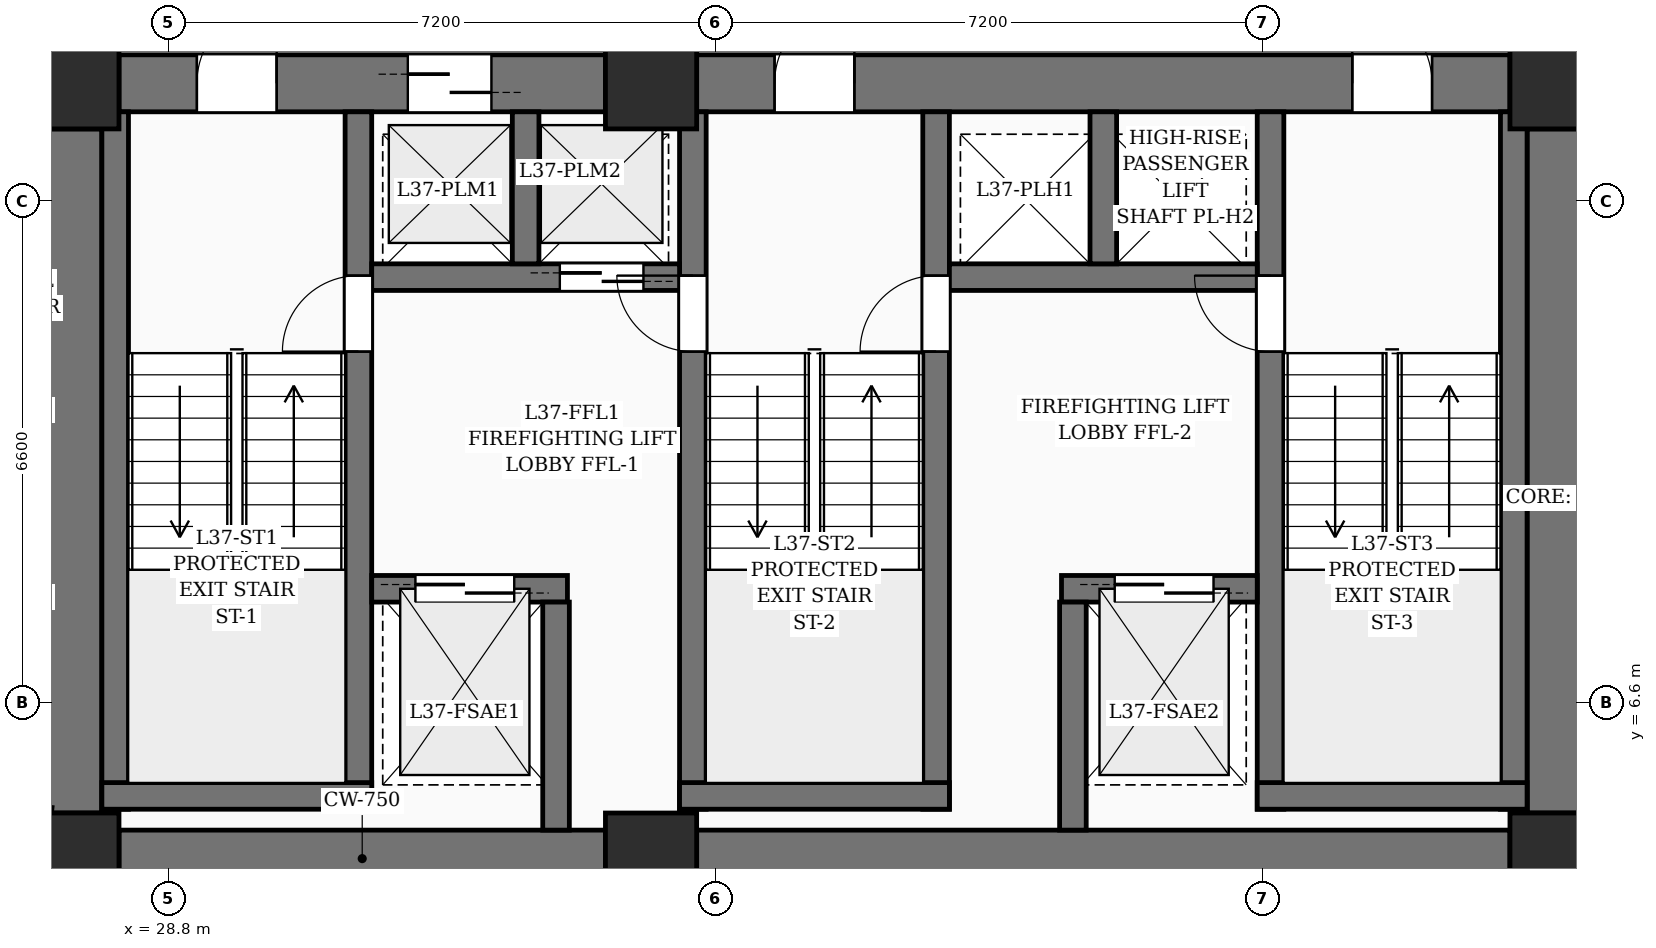
"""IFC4 building model, lengths in metres.
Left out: names, types, materials, properties, quantities, classifications, styles, units other than length and angle.
Written with IfcOpenShell. Run it as: python <this file> out.ifc"""

import sys

from ifc_helpers import new_model, si_unit, direction, frame, frame_2d, origin, origin_2d, place, context, subcontext, project, spatial, rectangle, extrude, element, fill, save


model = new_model("IFC4")
c1 = context("Model", 3, precision=1e-05, world=origin(), true_north=direction((0.0, 1.0)))
c2 = subcontext(c1, "Body", "Model", "MODEL_VIEW")
j1 = project(units=[si_unit("LENGTHUNIT", "METRE"), si_unit("PLANEANGLEUNIT", "RADIAN")], contexts=[c1])
p1 = place(None, origin())
s1 = spatial("IfcSite", under=j1, at=p1, CompositionType="ELEMENT")
p2 = place(p1, origin())
s2 = spatial("IfcBuilding", under=s1, at=p2, CompositionType="ELEMENT")
p3 = place(p2, frame((0.0, 0.0, 146.4)))
s3 = spatial("IfcBuildingStorey", under=s2, at=p3, CompositionType="ELEMENT", Elevation=146.4)
for number, where, z_axis, x_axis in (
    (1, (27.55, 4.55, 0.0), (0.0, 0.0, 1.0), (1.0, 0.0, 0.0)),
    (2, (35.15, 4.55, 0.0), (0.0, 0.0, 1.0), (1.0, 0.0, 0.0)),
    (3, (47.05, 4.55, 0.0), (0.0, 0.0, 1.0), (1.0, 0.0, 0.0)),
    (4, (27.55, 14.75, 0.0), (0.0, 0.0, 1.0), (1.0, 0.0, 0.0)),
    (5, (35.15, 14.75, 0.0), (0.0, 0.0, 1.0), (1.0, 0.0, 0.0)),
    (6, (47.05, 14.75, 0.0), (0.0, 0.0, 1.0), (1.0, 0.0, 0.0)),
):
    element("IfcColumn", number, at=place(p3, frame(where, z_axis=z_axis, x_axis=x_axis)), inside=s3, PredefinedType="COLUMN", context=c2, shape_type="SweptSolid", body=[
        extrude(rectangle(XDim=1.2, YDim=1.2, at=origin_2d()), origin(), (0.0, 0.0, 1.0), 3.6),
    ])
p4 = place(p3, frame((28.15, 4.55, 0.0), z_axis=(0.0, 0.0, 1.0), x_axis=(1.0, 0.0, 0.0)))
e7 = element("IfcWall", 7, at=p4, inside=s3, PredefinedType="SHEAR", context=c2, shape_type="SweptSolid", body=[
    extrude(rectangle(XDim=6.4, YDim=0.75, at=frame_2d((3.2, 0.0))), origin(), (0.0, 0.0, 1.0), 3.6),
])
p5 = place(p3, frame((35.75, 4.55, 0.0), z_axis=(0.0, 0.0, 1.0), x_axis=(1.0, 0.0, 0.0)))
e8 = element("IfcWall", 8, at=p5, inside=s3, PredefinedType="SHEAR", context=c2, shape_type="SweptSolid", body=[
    extrude(rectangle(XDim=10.7, YDim=0.75, at=frame_2d((5.35, 0.0))), origin(), (0.0, 0.0, 1.0), 3.6),
])
p6 = place(p3, frame((28.15, 14.75, 0.0), z_axis=(0.0, 0.0, 1.0), x_axis=(1.0, 0.0, 0.0)))
e9 = element("IfcWall", 9, at=p6, inside=s3, PredefinedType="SHEAR", context=c2, shape_type="SweptSolid", body=[
    extrude(rectangle(XDim=6.4, YDim=0.75, at=frame_2d((3.2, 0.0))), origin(), (0.0, 0.0, 1.0), 3.6),
])
p7 = place(p6, frame((1.025, 0.0, 0.0)))
e10 = element("IfcOpeningElement", 10, at=p7, cuts=e9, PredefinedType="OPENING", context=c2, shape_type="SweptSolid", body=[
    extrude(rectangle(XDim=1.05, YDim=2.15, at=frame_2d((0.525, 1.075))), frame((0.0, 0.385, 0.0), z_axis=(0.0, -1.0, 0.0), x_axis=(1.0, 0.0, 0.0)), (0.0, 0.0, 1.0), 0.77),
])
p8 = place(p6, frame((3.8, 0.0, 0.0)))
e11 = element("IfcOpeningElement", 11, at=p8, cuts=e9, PredefinedType="OPENING", context=c2, shape_type="SweptSolid", body=[
    extrude(rectangle(XDim=1.1, YDim=2.2, at=frame_2d((0.55, 1.1))), frame((0.0, 0.385, 0.0), z_axis=(0.0, -1.0, 0.0), x_axis=(1.0, 0.0, 0.0)), (0.0, 0.0, 1.0), 0.77),
])
p9 = place(p3, frame((35.75, 14.75, 0.0), z_axis=(0.0, 0.0, 1.0), x_axis=(1.0, 0.0, 0.0)))
e12 = element("IfcWall", 12, at=p9, inside=s3, PredefinedType="SHEAR", context=c2, shape_type="SweptSolid", body=[
    extrude(rectangle(XDim=10.7, YDim=0.75, at=frame_2d((5.35, 0.0))), origin(), (0.0, 0.0, 1.0), 3.6),
])
p10 = place(p9, frame((1.025, 0.0, 0.0)))
e13 = element("IfcOpeningElement", 13, at=p10, cuts=e12, PredefinedType="OPENING", context=c2, shape_type="SweptSolid", body=[
    extrude(rectangle(XDim=1.05, YDim=2.15, at=frame_2d((0.525, 1.075))), frame((0.0, 0.385, 0.0), z_axis=(0.0, -1.0, 0.0), x_axis=(1.0, 0.0, 0.0)), (0.0, 0.0, 1.0), 0.77),
])
p11 = place(p9, frame((8.625, 0.0, 0.0)))
e14 = element("IfcOpeningElement", 14, at=p11, cuts=e12, PredefinedType="OPENING", context=c2, shape_type="SweptSolid", body=[
    extrude(rectangle(XDim=1.05, YDim=2.15, at=frame_2d((0.525, 1.075))), frame((0.0, 0.385, 0.0), z_axis=(0.0, -1.0, 0.0), x_axis=(1.0, 0.0, 0.0)), (0.0, 0.0, 1.0), 0.77),
])
for number, where, z_axis, x_axis in (
    (15, (27.55, 5.15, 0.0), (0.0, 0.0, 1.0), (0.0, 1.0, 0.0)),
    (16, (47.05, 5.15, 0.0), (0.0, 0.0, 1.0), (0.0, 1.0, 0.0)),
):
    element("IfcWall", number, at=place(p3, frame(where, z_axis=z_axis, x_axis=x_axis)), inside=s3, PredefinedType="SHEAR", context=c2, shape_type="SweptSolid", body=[
        extrude(rectangle(XDim=9.0, YDim=0.75, at=frame_2d((4.5, 0.0))), origin(), (0.0, 0.0, 1.0), 3.6),
    ])
p12 = place(p3, frame((28.1, 5.2, 0.0), z_axis=(0.0, 0.0, 1.0), x_axis=(0.0, 1.0, 0.0)))
e17 = element("IfcWall", 17, at=p12, inside=s3, PredefinedType="SOLIDWALL", context=c2, shape_type="SweptSolid", body=[
    extrude(rectangle(XDim=9.175, YDim=0.35, at=frame_2d((4.587, 0.0))), origin(), (0.0, 0.0, 1.0), 3.6),
])
p13 = place(p3, frame((31.3, 5.2, 0.0), z_axis=(0.0, 0.0, 1.0), x_axis=(0.0, 1.0, 0.0)))
e18 = element("IfcWall", 18, at=p13, inside=s3, PredefinedType="SOLIDWALL", context=c2, shape_type="SweptSolid", body=[
    extrude(rectangle(XDim=9.175, YDim=0.35, at=frame_2d((4.587, 0.0))), origin(), (0.0, 0.0, 1.0), 3.6),
])
p14 = place(p13, frame((6.02, 0.0, 0.0)))
e19 = element("IfcOpeningElement", 19, at=p14, cuts=e18, PredefinedType="OPENING", context=c2, shape_type="SweptSolid", body=[
    extrude(rectangle(XDim=1.0, YDim=2.15, at=frame_2d((0.5, 1.075))), frame((0.0, 0.185, 0.0), z_axis=(0.0, -1.0, 0.0), x_axis=(1.0, 0.0, 0.0)), (0.0, 0.0, 1.0), 0.37),
])
p15 = place(p3, frame((27.925, 5.375, 0.0), z_axis=(0.0, 0.0, 1.0), x_axis=(1.0, 0.0, 0.0)))
e20 = element("IfcWall", 20, at=p15, inside=s3, PredefinedType="SOLIDWALL", context=c2, shape_type="SweptSolid", body=[
    extrude(rectangle(XDim=3.55, YDim=0.35, at=frame_2d((1.775, 0.0))), origin(), (0.0, 0.0, 1.0), 3.6),
])
p16 = place(p3, frame((35.7, 5.2, 0.0), z_axis=(0.0, 0.0, 1.0), x_axis=(0.0, 1.0, 0.0)))
e21 = element("IfcWall", 21, at=p16, inside=s3, PredefinedType="SOLIDWALL", context=c2, shape_type="SweptSolid", body=[
    extrude(rectangle(XDim=9.175, YDim=0.35, at=frame_2d((4.587, 0.0))), origin(), (0.0, 0.0, 1.0), 3.6),
])
p17 = place(p16, frame((6.02, 0.0, 0.0)))
e22 = element("IfcOpeningElement", 22, at=p17, cuts=e21, PredefinedType="OPENING", context=c2, shape_type="SweptSolid", body=[
    extrude(rectangle(XDim=1.0, YDim=2.15, at=frame_2d((0.5, 1.075))), frame((0.0, 0.185, 0.0), z_axis=(0.0, -1.0, 0.0), x_axis=(1.0, 0.0, 0.0)), (0.0, 0.0, 1.0), 0.37),
])
p18 = place(p3, frame((38.9, 5.2, 0.0), z_axis=(0.0, 0.0, 1.0), x_axis=(0.0, 1.0, 0.0)))
e23 = element("IfcWall", 23, at=p18, inside=s3, PredefinedType="SOLIDWALL", context=c2, shape_type="SweptSolid", body=[
    extrude(rectangle(XDim=9.175, YDim=0.35, at=frame_2d((4.587, 0.0))), origin(), (0.0, 0.0, 1.0), 3.6),
])
p19 = place(p18, frame((6.02, 0.0, 0.0)))
e24 = element("IfcOpeningElement", 24, at=p19, cuts=e23, PredefinedType="OPENING", context=c2, shape_type="SweptSolid", body=[
    extrude(rectangle(XDim=1.0, YDim=2.15, at=frame_2d((0.5, 1.075))), frame((0.0, 0.185, 0.0), z_axis=(0.0, -1.0, 0.0), x_axis=(1.0, 0.0, 0.0)), (0.0, 0.0, 1.0), 0.37),
])
p20 = place(p3, frame((35.525, 5.375, 0.0), z_axis=(0.0, 0.0, 1.0), x_axis=(1.0, 0.0, 0.0)))
e25 = element("IfcWall", 25, at=p20, inside=s3, PredefinedType="SOLIDWALL", context=c2, shape_type="SweptSolid", body=[
    extrude(rectangle(XDim=3.55, YDim=0.35, at=frame_2d((1.775, 0.0))), origin(), (0.0, 0.0, 1.0), 3.6),
])
p21 = place(p3, frame((43.3, 5.2, 0.0), z_axis=(0.0, 0.0, 1.0), x_axis=(0.0, 1.0, 0.0)))
e26 = element("IfcWall", 26, at=p21, inside=s3, PredefinedType="SOLIDWALL", context=c2, shape_type="SweptSolid", body=[
    extrude(rectangle(XDim=9.175, YDim=0.35, at=frame_2d((4.587, 0.0))), origin(), (0.0, 0.0, 1.0), 3.6),
])
p22 = place(p21, frame((6.02, 0.0, 0.0)))
e27 = element("IfcOpeningElement", 27, at=p22, cuts=e26, PredefinedType="OPENING", context=c2, shape_type="SweptSolid", body=[
    extrude(rectangle(XDim=1.0, YDim=2.15, at=frame_2d((0.5, 1.075))), frame((0.0, 0.185, 0.0), z_axis=(0.0, -1.0, 0.0), x_axis=(1.0, 0.0, 0.0)), (0.0, 0.0, 1.0), 0.37),
])
p23 = place(p3, frame((46.5, 5.2, 0.0), z_axis=(0.0, 0.0, 1.0), x_axis=(0.0, 1.0, 0.0)))
e28 = element("IfcWall", 28, at=p23, inside=s3, PredefinedType="SOLIDWALL", context=c2, shape_type="SweptSolid", body=[
    extrude(rectangle(XDim=9.175, YDim=0.35, at=frame_2d((4.587, 0.0))), origin(), (0.0, 0.0, 1.0), 3.6),
])
p24 = place(p3, frame((43.125, 5.375, 0.0), z_axis=(0.0, 0.0, 1.0), x_axis=(1.0, 0.0, 0.0)))
e29 = element("IfcWall", 29, at=p24, inside=s3, PredefinedType="SOLIDWALL", context=c2, shape_type="SweptSolid", body=[
    extrude(rectangle(XDim=3.55, YDim=0.35, at=frame_2d((1.775, 0.0))), origin(), (0.0, 0.0, 1.0), 3.6),
])
p25 = place(p3, frame((31.475, 8.1, 0.0), z_axis=(0.0, 0.0, 1.0), x_axis=(1.0, 0.0, 0.0)))
e30 = element("IfcWall", 30, at=p25, inside=s3, PredefinedType="SOLIDWALL", context=c2, shape_type="SweptSolid", body=[
    extrude(rectangle(XDim=2.575, YDim=0.35, at=frame_2d((1.288, 0.0))), origin(), (0.0, 0.0, 1.0), 3.6),
])
p26 = place(p25, frame((0.575, 0.0, 0.0)))
e31 = element("IfcOpeningElement", 31, at=p26, cuts=e30, PredefinedType="OPENING", context=c2, shape_type="SweptSolid", body=[
    extrude(rectangle(XDim=1.3, YDim=2.25, at=frame_2d((0.65, 1.125))), frame((0.0, 0.185, 0.0), z_axis=(0.0, -1.0, 0.0), x_axis=(1.0, 0.0, 0.0)), (0.0, 0.0, 1.0), 0.37),
])
p27 = place(p3, frame((40.55, 8.1, 0.0), z_axis=(0.0, 0.0, 1.0), x_axis=(1.0, 0.0, 0.0)))
e32 = element("IfcWall", 32, at=p27, inside=s3, PredefinedType="SOLIDWALL", context=c2, shape_type="SweptSolid", body=[
    extrude(rectangle(XDim=2.575, YDim=0.35, at=frame_2d((1.288, 0.0))), origin(), (0.0, 0.0, 1.0), 3.6),
])
p28 = place(p27, frame((0.7, 0.0, 0.0)))
e33 = element("IfcOpeningElement", 33, at=p28, cuts=e32, PredefinedType="OPENING", context=c2, shape_type="SweptSolid", body=[
    extrude(rectangle(XDim=1.3, YDim=2.25, at=frame_2d((0.65, 1.125))), frame((0.0, 0.185, 0.0), z_axis=(0.0, -1.0, 0.0), x_axis=(1.0, 0.0, 0.0)), (0.0, 0.0, 1.0), 0.37),
])
for number, where, z_axis, x_axis in (
    (34, (33.9, 4.925, 0.0), (0.0, 0.0, 1.0), (0.0, 1.0, 0.0)),
    (35, (40.7, 4.925, 0.0), (0.0, 0.0, 1.0), (0.0, 1.0, 0.0)),
):
    element("IfcWall", number, at=place(p3, frame(where, z_axis=z_axis, x_axis=x_axis)), inside=s3, PredefinedType="SOLIDWALL", context=c2, shape_type="SweptSolid", body=[
        extrude(rectangle(XDim=3.0, YDim=0.35, at=frame_2d((1.5, 0.0))), origin(), (0.0, 0.0, 1.0), 3.6),
    ])
p29 = place(p3, frame((31.475, 12.2, 0.0), z_axis=(0.0, 0.0, 1.0), x_axis=(1.0, 0.0, 0.0)))
e36 = element("IfcWall", 36, at=p29, inside=s3, PredefinedType="SOLIDWALL", context=c2, shape_type="SweptSolid", body=[
    extrude(rectangle(XDim=4.05, YDim=0.35, at=frame_2d((2.025, 0.0))), origin(), (0.0, 0.0, 1.0), 3.6),
])
p30 = place(p29, frame((2.475, 0.0, 0.0)))
e37 = element("IfcOpeningElement", 37, at=p30, cuts=e36, PredefinedType="OPENING", context=c2, shape_type="SweptSolid", body=[
    extrude(rectangle(XDim=1.1, YDim=2.2, at=frame_2d((0.55, 1.1))), frame((0.0, 0.185, 0.0), z_axis=(0.0, -1.0, 0.0), x_axis=(1.0, 0.0, 0.0)), (0.0, 0.0, 1.0), 0.37),
])
p31 = place(p3, frame((33.5, 12.375, 0.0), z_axis=(0.0, 0.0, 1.0), x_axis=(0.0, 1.0, 0.0)))
e38 = element("IfcWall", 38, at=p31, inside=s3, PredefinedType="SOLIDWALL", context=c2, shape_type="SweptSolid", body=[
    extrude(rectangle(XDim=2.0, YDim=0.35, at=frame_2d((1.0, 0.0))), origin(), (0.0, 0.0, 1.0), 3.6),
])
p32 = place(p3, frame((39.075, 12.2, 0.0), z_axis=(0.0, 0.0, 1.0), x_axis=(1.0, 0.0, 0.0)))
e39 = element("IfcWall", 39, at=p32, inside=s3, PredefinedType="SOLIDWALL", context=c2, shape_type="SweptSolid", body=[
    extrude(rectangle(XDim=4.05, YDim=0.35, at=frame_2d((2.025, 0.0))), origin(), (0.0, 0.0, 1.0), 3.6),
])
p33 = place(p3, frame((41.1, 12.375, 0.0), z_axis=(0.0, 0.0, 1.0), x_axis=(0.0, 1.0, 0.0)))
e40 = element("IfcWall", 40, at=p33, inside=s3, PredefinedType="SOLIDWALL", context=c2, shape_type="SweptSolid", body=[
    extrude(rectangle(XDim=2.0, YDim=0.35, at=frame_2d((1.0, 0.0))), origin(), (0.0, 0.0, 1.0), 3.6),
])
p34 = place(p7, origin())
e41 = element("IfcDoor", 41, at=p34, inside=s3, OperationType="SINGLE_SWING_RIGHT", PredefinedType="DOOR", context=c2, shape_type="SweptSolid", body=[
    extrude(rectangle(XDim=1.05, YDim=2.15, at=frame_2d((0.525, 1.075))), frame((0.0, 0.025, 0.0), z_axis=(0.0, -1.0, 0.0), x_axis=(1.0, 0.0, 0.0)), (0.0, 0.0, 1.0), 0.05),
])
fill(e10, e41)
p35 = place(p10, origin())
e42 = element("IfcDoor", 42, at=p35, inside=s3, OperationType="SINGLE_SWING_RIGHT", PredefinedType="DOOR", context=c2, shape_type="SweptSolid", body=[
    extrude(rectangle(XDim=1.05, YDim=2.15, at=frame_2d((0.525, 1.075))), frame((0.0, 0.025, 0.0), z_axis=(0.0, -1.0, 0.0), x_axis=(1.0, 0.0, 0.0)), (0.0, 0.0, 1.0), 0.05),
])
fill(e13, e42)
p36 = place(p11, origin())
e43 = element("IfcDoor", 43, at=p36, inside=s3, OperationType="SINGLE_SWING_LEFT", PredefinedType="DOOR", context=c2, shape_type="SweptSolid", body=[
    extrude(rectangle(XDim=1.05, YDim=2.15, at=frame_2d((0.525, 1.075))), frame((0.0, 0.025, 0.0), z_axis=(0.0, -1.0, 0.0), x_axis=(1.0, 0.0, 0.0)), (0.0, 0.0, 1.0), 0.05),
])
fill(e14, e43)
p37 = place(p14, origin())
e44 = element("IfcDoor", 44, at=p37, inside=s3, OperationType="SINGLE_SWING_LEFT", PredefinedType="DOOR", context=c2, shape_type="SweptSolid", body=[
    extrude(rectangle(XDim=1.0, YDim=2.15, at=frame_2d((0.5, 1.075))), frame((0.0, 0.025, 0.0), z_axis=(0.0, -1.0, 0.0), x_axis=(1.0, 0.0, 0.0)), (0.0, 0.0, 1.0), 0.05),
])
fill(e19, e44)
p38 = place(p17, origin())
e45 = element("IfcDoor", 45, at=p38, inside=s3, OperationType="SINGLE_SWING_RIGHT", PredefinedType="DOOR", context=c2, shape_type="SweptSolid", body=[
    extrude(rectangle(XDim=1.0, YDim=2.15, at=frame_2d((0.5, 1.075))), frame((0.0, 0.025, 0.0), z_axis=(0.0, -1.0, 0.0), x_axis=(1.0, 0.0, 0.0)), (0.0, 0.0, 1.0), 0.05),
])
fill(e22, e45)
p39 = place(p19, origin())
e46 = element("IfcDoor", 46, at=p39, inside=s3, OperationType="SINGLE_SWING_LEFT", PredefinedType="DOOR", context=c2, shape_type="SweptSolid", body=[
    extrude(rectangle(XDim=1.0, YDim=2.15, at=frame_2d((0.5, 1.075))), frame((0.0, 0.025, 0.0), z_axis=(0.0, -1.0, 0.0), x_axis=(1.0, 0.0, 0.0)), (0.0, 0.0, 1.0), 0.05),
])
fill(e24, e46)
p40 = place(p22, origin())
e47 = element("IfcDoor", 47, at=p40, inside=s3, OperationType="SINGLE_SWING_RIGHT", PredefinedType="DOOR", context=c2, shape_type="SweptSolid", body=[
    extrude(rectangle(XDim=1.0, YDim=2.15, at=frame_2d((0.5, 1.075))), frame((0.0, 0.025, 0.0), z_axis=(0.0, -1.0, 0.0), x_axis=(1.0, 0.0, 0.0)), (0.0, 0.0, 1.0), 0.05),
])
fill(e27, e47)
p41 = place(p26, origin())
e48 = element("IfcDoor", 48, at=p41, inside=s3, OperationType="DOUBLE_DOOR_SLIDING", PredefinedType="DOOR", context=c2, shape_type="SweptSolid", body=[
    extrude(rectangle(XDim=1.3, YDim=2.25, at=frame_2d((0.65, 1.125))), frame((0.0, 0.025, 0.0), z_axis=(0.0, -1.0, 0.0), x_axis=(1.0, 0.0, 0.0)), (0.0, 0.0, 1.0), 0.05),
])
fill(e31, e48)
p42 = place(p28, origin())
e49 = element("IfcDoor", 49, at=p42, inside=s3, OperationType="DOUBLE_DOOR_SLIDING", PredefinedType="DOOR", context=c2, shape_type="SweptSolid", body=[
    extrude(rectangle(XDim=1.3, YDim=2.25, at=frame_2d((0.65, 1.125))), frame((0.0, 0.025, 0.0), z_axis=(0.0, -1.0, 0.0), x_axis=(1.0, 0.0, 0.0)), (0.0, 0.0, 1.0), 0.05),
])
fill(e33, e49)
p43 = place(p8, origin())
e50 = element("IfcDoor", 50, at=p43, inside=s3, OperationType="DOUBLE_DOOR_SLIDING", PredefinedType="DOOR", context=c2, shape_type="SweptSolid", body=[
    extrude(rectangle(XDim=1.1, YDim=2.2, at=frame_2d((0.55, 1.1))), frame((0.0, 0.025, 0.0), z_axis=(0.0, -1.0, 0.0), x_axis=(1.0, 0.0, 0.0)), (0.0, 0.0, 1.0), 0.05),
])
fill(e11, e50)
p44 = place(p30, origin())
e51 = element("IfcDoor", 51, at=p44, inside=s3, OperationType="DOUBLE_DOOR_SLIDING", PredefinedType="DOOR", context=c2, shape_type="SweptSolid", body=[
    extrude(rectangle(XDim=1.1, YDim=2.2, at=frame_2d((0.55, 1.1))), frame((0.0, 0.025, 0.0), z_axis=(0.0, -1.0, 0.0), x_axis=(1.0, 0.0, 0.0)), (0.0, 0.0, 1.0), 0.05),
])
fill(e37, e51)
save(model, sys.argv[1])
